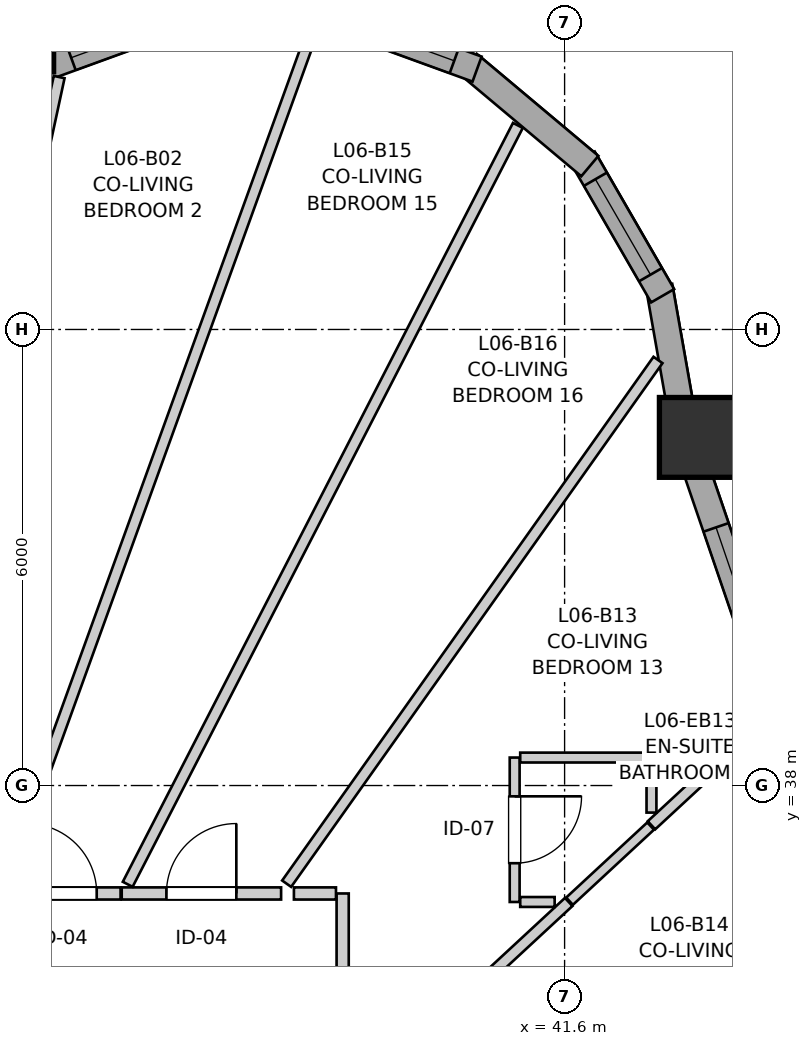
"""IFC4 building model, lengths in metres.
Left out: names, types, materials, properties, quantities, classifications, styles, units other than length and angle.
Written with IfcOpenShell. Run it as: python <this file> out.ifc"""

import sys

from ifc_helpers import new_model, si_unit, direction, frame, frame_2d, origin, origin_2d, place, context, subcontext, project, spatial, rectangle, i_section, extrude, source, transform, mapped, element, fill, save


model = new_model("IFC4")
c1 = context("Model", 3, precision=1e-05, world=origin(), true_north=direction((0.0, 1.0)))
c2 = subcontext(c1, "Body", "Model", "MODEL_VIEW")
j1 = project(units=[si_unit("LENGTHUNIT", "METRE"), si_unit("PLANEANGLEUNIT", "RADIAN")], contexts=[c1])
p1 = place(None, origin())
s1 = spatial("IfcSite", under=j1, at=p1, CompositionType="ELEMENT")
p2 = place(p1, origin())
s2 = spatial("IfcBuilding", under=s1, at=p2, CompositionType="ELEMENT")
p3 = place(p2, frame((0.0, 0.0, 23.8)))
s3 = spatial("IfcBuildingStorey", under=s2, at=p3, CompositionType="ELEMENT", Elevation=23.8)
m1 = source(origin(), c2, "Body", "SweptSolid", [
    extrude(rectangle(XDim=1.05, YDim=1.05, at=origin_2d()), origin(), (0.0, 0.0, 1.0), 2.935),
])
p4 = place(p3, frame((43.373, 42.58, 0.0), z_axis=(0.0, 0.0, 1.0), x_axis=(1.0, 0.0, 0.0)))
e1 = element("IfcColumn", 1, at=p4, inside=s3, PredefinedType="COLUMN", context=c2, shape_type="MappedRepresentation", body=[
    mapped(m1, transform((0.0, 0.0, 0.0), x_axis=(1.0, 0.0, 0.0), y_axis=(0.0, 1.0, 0.0), z_axis=(0.0, 0.0, 1.0), scale=1.0)),
])
m2 = source(origin(), c2, "Body", "SweptSolid", [
    extrude(i_section(OverallWidth=0.409, OverallDepth=0.425, WebThickness=0.03, FlangeThickness=0.048, FilletRadius=0.015, at=origin_2d()), origin(), (0.0, 0.0, 1.0), 2.935),
])
p5 = place(p3, frame((34.673, 47.603, 0.0), z_axis=(0.0, 0.0, 1.0), x_axis=(1.0, 0.0, 0.0)))
e2 = element("IfcColumn", 2, at=p5, inside=s3, PredefinedType="PILASTER", context=c2, shape_type="MappedRepresentation", body=[
    mapped(m2, transform((0.0, 0.0, 0.0), x_axis=(1.0, 0.0, 0.0), y_axis=(0.0, 1.0, 0.0), z_axis=(0.0, 0.0, 1.0), scale=1.0)),
])
p6 = place(p3, frame((44.353, 39.171, 0.0), z_axis=(0.0, 0.0, 1.0), x_axis=(-0.323604310653, 0.946192501623, 0.0)))
e3 = element("IfcWall", 3, at=p6, inside=s3, PredefinedType="SOLIDWALL", context=c2, shape_type="SweptSolid", body=[
    extrude(rectangle(XDim=3.243, YDim=0.35, at=frame_2d((1.621, 0.0))), origin(), (0.0, 0.0, 1.0), 2.415),
])
p7 = place(p6, frame((0.901, 0.0, 0.82)))
e4 = element("IfcOpeningElement", 4, at=p7, cuts=e3, PredefinedType="OPENING", context=c2, shape_type="SweptSolid", body=[
    extrude(rectangle(XDim=1.45, YDim=1.25, at=frame_2d((0.725, 0.625))), frame((0.0, 0.185, 0.0), z_axis=(0.0, -1.0, 0.0), x_axis=(1.0, 0.0, 0.0)), (0.0, 0.0, 1.0), 0.37),
])
p8 = place(p3, frame((43.148, 42.845, 0.0), z_axis=(0.0, 0.0, 1.0), x_axis=(-0.173745591742, 0.984790571315, 0.0)))
e5 = element("IfcWall", 5, at=p8, inside=s3, PredefinedType="SOLIDWALL", context=c2, shape_type="SweptSolid", body=[
    extrude(rectangle(XDim=1.752, YDim=0.35, at=frame_2d((0.876, 0.0))), origin(), (0.0, 0.0, 1.0), 2.415),
])
p9 = place(p3, frame((42.89, 44.443, 0.0), z_axis=(0.0, 0.0, 1.0), x_axis=(-0.499995423472, 0.866028046028, 0.0)))
e6 = element("IfcWall", 6, at=p9, inside=s3, PredefinedType="SOLIDWALL", context=c2, shape_type="SweptSolid", body=[
    extrude(rectangle(XDim=2.09, YDim=0.35, at=frame_2d((1.045, 0.0))), origin(), (0.0, 0.0, 1.0), 2.415),
])
p10 = place(p9, frame((0.32, 0.0, 0.82)))
e7 = element("IfcOpeningElement", 7, at=p10, cuts=e6, PredefinedType="OPENING", context=c2, shape_type="SweptSolid", body=[
    extrude(rectangle(XDim=1.45, YDim=1.25, at=frame_2d((0.725, 0.625))), frame((0.0, 0.185, 0.0), z_axis=(0.0, -1.0, 0.0), x_axis=(1.0, 0.0, 0.0)), (0.0, 0.0, 1.0), 0.37),
])
p11 = place(p3, frame((41.932, 46.15, 0.0), z_axis=(0.0, 0.0, 1.0), x_axis=(-0.766024572719, 0.642811289563, 0.0)))
e8 = element("IfcWall", 8, at=p11, inside=s3, PredefinedType="SOLIDWALL", context=c2, shape_type="SweptSolid", body=[
    extrude(rectangle(XDim=2.09, YDim=0.35, at=frame_2d((1.045, 0.0))), origin(), (0.0, 0.0, 1.0), 2.415),
])
p12 = place(p3, frame((40.448, 47.426, 0.0), z_axis=(0.0, 0.0, 1.0), x_axis=(-0.939711556618, 0.341968113072, 0.0)))
e9 = element("IfcWall", 9, at=p12, inside=s3, PredefinedType="SOLIDWALL", context=c2, shape_type="SweptSolid", body=[
    extrude(rectangle(XDim=2.09, YDim=0.35, at=frame_2d((1.045, 0.0))), origin(), (0.0, 0.0, 1.0), 2.415),
])
p13 = place(p12, frame((0.32, 0.0, 0.82)))
e10 = element("IfcOpeningElement", 10, at=p13, cuts=e9, PredefinedType="OPENING", context=c2, shape_type="SweptSolid", body=[
    extrude(rectangle(XDim=1.45, YDim=1.25, at=frame_2d((0.725, 0.625))), frame((0.0, 0.185, 0.0), z_axis=(0.0, -1.0, 0.0), x_axis=(1.0, 0.0, 0.0)), (0.0, 0.0, 1.0), 0.37),
])
p14 = place(p3, frame((36.661, 48.14, 0.0), z_axis=(0.0, 0.0, 1.0), x_axis=(-0.939691662178, -0.342022777067, 0.0)))
e11 = element("IfcWall", 11, at=p14, inside=s3, PredefinedType="SOLIDWALL", context=c2, shape_type="SweptSolid", body=[
    extrude(rectangle(XDim=2.032, YDim=0.35, at=frame_2d((1.016, 0.0))), origin(), (0.0, 0.0, 1.0), 2.415),
])
p15 = place(p14, frame((0.302, 0.0, 0.82)))
e12 = element("IfcOpeningElement", 12, at=p15, cuts=e11, PredefinedType="OPENING", context=c2, shape_type="SweptSolid", body=[
    extrude(rectangle(XDim=1.35, YDim=1.45, at=frame_2d((0.675, 0.725))), frame((0.0, 0.185, 0.0), z_axis=(0.0, -1.0, 0.0), x_axis=(1.0, 0.0, 0.0)), (0.0, 0.0, 1.0), 0.37),
])
p16 = place(p3, frame((38.68, 36.58, 0.0), z_axis=(0.0, 0.0, 1.0), x_axis=(0.0, -1.0, 0.0)))
e13 = element("IfcWall", 13, at=p16, inside=s3, PredefinedType="PARTITIONING", context=c2, shape_type="SweptSolid", body=[
    extrude(rectangle(XDim=2.83, YDim=0.16, at=frame_2d((1.415, 0.0))), origin(), (0.0, 0.0, 1.0), 2.935),
])
p17 = place(p16, frame((0.973, 0.0, 0.0)))
e14 = element("IfcOpeningElement", 14, at=p17, cuts=e13, PredefinedType="OPENING", context=c2, shape_type="SweptSolid", body=[
    extrude(rectangle(XDim=0.92, YDim=2.1, at=frame_2d((0.46, 1.05))), frame((0.0, 0.09, 0.0), z_axis=(0.0, -1.0, 0.0), x_axis=(1.0, 0.0, 0.0)), (0.0, 0.0, 1.0), 0.18),
])
p18 = place(p3, frame((35.773, 36.58, 0.0), z_axis=(0.0, 0.0, 1.0), x_axis=(1.0, 0.0, 0.0)))
e15 = element("IfcWall", 15, at=p18, inside=s3, PredefinedType="PARTITIONING", context=c2, shape_type="SweptSolid", body=[
    extrude(rectangle(XDim=2.097, YDim=0.16, at=frame_2d((1.049, 0.0))), origin(), (0.0, 0.0, 1.0), 2.935),
])
p19 = place(p18, frame((0.588, 0.0, 0.0)))
e16 = element("IfcOpeningElement", 16, at=p19, cuts=e15, PredefinedType="OPENING", context=c2, shape_type="SweptSolid", body=[
    extrude(rectangle(XDim=0.92, YDim=2.1, at=frame_2d((0.46, 1.05))), frame((0.0, 0.09, 0.0), z_axis=(0.0, -1.0, 0.0), x_axis=(1.0, 0.0, 0.0)), (0.0, 0.0, 1.0), 0.18),
])
p20 = place(p3, frame((40.943, 38.368, 0.0), z_axis=(0.0, 0.0, 1.0), x_axis=(0.0, -1.0, 0.0)))
e17 = element("IfcWall", 17, at=p20, inside=s3, PredefinedType="PARTITIONING", context=c2, shape_type="SweptSolid", body=[
    extrude(rectangle(XDim=1.9, YDim=0.13, at=frame_2d((0.95, 0.0))), origin(), (0.0, 0.0, 1.0), 2.935),
])
p21 = place(p20, frame((0.51, 0.0, 0.0)))
e18 = element("IfcOpeningElement", 18, at=p21, cuts=e17, PredefinedType="OPENING", context=c2, shape_type="SweptSolid", body=[
    extrude(rectangle(XDim=0.88, YDim=2.05, at=frame_2d((0.44, 1.025))), frame((0.0, 0.075, 0.0), z_axis=(0.0, -1.0, 0.0), x_axis=(1.0, 0.0, 0.0)), (0.0, 0.0, 1.0), 0.15),
])
p22 = place(p3, frame((34.162, 36.58, 0.0), z_axis=(0.0, 0.0, 1.0), x_axis=(1.0, 0.0, 0.0)))
e19 = element("IfcWall", 19, at=p22, inside=s3, PredefinedType="PARTITIONING", context=c2, shape_type="SweptSolid", body=[
    extrude(rectangle(XDim=1.596, YDim=0.16, at=frame_2d((0.798, 0.0))), origin(), (0.0, 0.0, 1.0), 2.935),
])
p23 = place(p22, frame((0.362, 0.0, 0.0)))
e20 = element("IfcOpeningElement", 20, at=p23, cuts=e19, PredefinedType="OPENING", context=c2, shape_type="SweptSolid", body=[
    extrude(rectangle(XDim=0.92, YDim=2.1, at=frame_2d((0.46, 1.05))), frame((0.0, 0.09, 0.0), z_axis=(0.0, -1.0, 0.0), x_axis=(1.0, 0.0, 0.0)), (0.0, 0.0, 1.0), 0.18),
])
p24 = place(p3, frame((34.219, 36.692, 0.0), z_axis=(0.0, 0.0, 1.0), x_axis=(0.340186046968, 0.940358151689, 0.0)))
e21 = element("IfcWall", 21, at=p24, inside=s3, PredefinedType="PARTITIONING", context=c2, shape_type="SweptSolid", body=[
    extrude(rectangle(XDim=11.951, YDim=0.145, at=frame_2d((5.976, 0.0))), origin(), (0.0, 0.0, 1.0), 2.935),
])
p25 = place(p3, frame((35.852, 36.7, 0.0), z_axis=(0.0, 0.0, 1.0), x_axis=(0.457258091214, 0.889334041865, 0.0)))
e22 = element("IfcWall", 22, at=p25, inside=s3, PredefinedType="PARTITIONING", context=c2, shape_type="SweptSolid", body=[
    extrude(rectangle(XDim=11.227, YDim=0.145, at=frame_2d((5.613, 0.0))), origin(), (0.0, 0.0, 1.0), 2.935),
])
p26 = place(p3, frame((32.655, 36.683, 0.0), z_axis=(0.0, 0.0, 1.0), x_axis=(0.210861831441, 0.977515876107, 0.0)))
e23 = element("IfcWall", 23, at=p26, inside=s3, PredefinedType="PARTITIONING", context=c2, shape_type="SweptSolid", body=[
    extrude(rectangle(XDim=10.882, YDim=0.145, at=frame_2d((5.441, 0.0))), origin(), (0.0, 0.0, 1.0), 2.935),
])
p27 = place(p3, frame((37.943, 36.708, 0.0), z_axis=(0.0, 0.0, 1.0), x_axis=(0.578429476704, 0.81573239514, 0.0)))
e24 = element("IfcWall", 24, at=p27, inside=s3, PredefinedType="PARTITIONING", context=c2, shape_type="SweptSolid", body=[
    extrude(rectangle(XDim=8.447, YDim=0.145, at=frame_2d((4.223, 0.0))), origin(), (0.0, 0.0, 1.0), 2.935),
])
p28 = place(p3, frame((38.815, 33.839, 0.0), z_axis=(0.0, 0.0, 1.0), x_axis=(0.733718730688, 0.67945332749, 0.0)))
e25 = element("IfcWall", 25, at=p28, inside=s3, PredefinedType="PARTITIONING", context=c2, shape_type="SweptSolid", body=[
    extrude(rectangle(XDim=3.869, YDim=0.145, at=frame_2d((1.935, 0.0))), origin(), (0.0, 0.0, 1.0), 2.935),
])
p29 = place(p3, frame((42.743, 37.477, 0.0), z_axis=(0.0, 0.0, 1.0), x_axis=(0.73374741774, 0.679422347999, 0.0)))
e26 = element("IfcWall", 26, at=p29, inside=s3, PredefinedType="PARTITIONING", context=c2, shape_type="SweptSolid", body=[
    extrude(rectangle(XDim=2.04, YDim=0.145, at=frame_2d((1.02, 0.0))), origin(), (0.0, 0.0, 1.0), 2.935),
])
p30 = place(p3, frame((41.016, 38.368, 0.0), z_axis=(0.0, 0.0, 1.0), x_axis=(1.0, 0.0, 0.0)))
e27 = element("IfcWall", 27, at=p30, inside=s3, PredefinedType="PARTITIONING", context=c2, shape_type="SweptSolid", body=[
    extrude(rectangle(XDim=1.727, YDim=0.13, at=frame_2d((0.863, 0.0))), origin(), (0.0, 0.0, 1.0), 2.935),
])
p31 = place(p3, frame((41.665, 36.478, 0.0), z_axis=(0.0, 0.0, 1.0), x_axis=(0.733534386117, 0.679652340821, 0.0)))
e28 = element("IfcWall", 28, at=p31, inside=s3, PredefinedType="PARTITIONING", context=c2, shape_type="SweptSolid", body=[
    extrude(rectangle(XDim=1.454, YDim=0.13, at=frame_2d((0.727, 0.0))), origin(), (0.0, 0.0, 1.0), 2.935),
])
p32 = place(p3, frame((42.743, 37.644, 0.0), z_axis=(0.0, 0.0, 1.0), x_axis=(0.0, 1.0, 0.0)))
e29 = element("IfcWall", 29, at=p32, inside=s3, PredefinedType="PARTITIONING", context=c2, shape_type="SweptSolid", body=[
    extrude(rectangle(XDim=0.651, YDim=0.13, at=frame_2d((0.325, 0.0))), origin(), (0.0, 0.0, 1.0), 2.935),
])
p33 = place(p3, frame((38.039, 36.58, 0.0), z_axis=(0.0, 0.0, 1.0), x_axis=(1.0, 0.0, 0.0)))
e30 = element("IfcWall", 30, at=p33, inside=s3, PredefinedType="PARTITIONING", context=c2, shape_type="SweptSolid", body=[
    extrude(rectangle(XDim=0.553, YDim=0.16, at=frame_2d((0.277, 0.0))), origin(), (0.0, 0.0, 1.0), 2.935),
])
p34 = place(p3, frame((41.016, 36.468, 0.0), z_axis=(0.0, 0.0, 1.0), x_axis=(1.0, 0.0, 0.0)))
e31 = element("IfcWall", 31, at=p34, inside=s3, PredefinedType="PARTITIONING", context=c2, shape_type="SweptSolid", body=[
    extrude(rectangle(XDim=0.453, YDim=0.13, at=frame_2d((0.227, 0.0))), origin(), (0.0, 0.0, 1.0), 2.935),
])
m3 = source(origin(), c2, "Body", "SweptSolid", [
    extrude(rectangle(XDim=1.45, YDim=1.25, at=frame_2d((0.725, 0.625))), frame((0.0, 0.03, 0.0), z_axis=(0.0, -1.0, 0.0), x_axis=(1.0, 0.0, 0.0)), (0.0, 0.0, 1.0), 0.06),
])
p35 = place(p7, origin())
e32 = element("IfcWindow", 32, at=p35, inside=s3, PartitioningType="SINGLE_PANEL", PredefinedType="WINDOW", context=c2, shape_type="MappedRepresentation", body=[
    mapped(m3, transform((0.0, 0.0, 0.0), x_axis=(1.0, 0.0, 0.0), y_axis=(0.0, 1.0, 0.0), z_axis=(0.0, 0.0, 1.0), scale=1.0)),
])
fill(e4, e32)
p36 = place(p10, origin())
e33 = element("IfcWindow", 33, at=p36, inside=s3, PartitioningType="SINGLE_PANEL", PredefinedType="WINDOW", context=c2, shape_type="MappedRepresentation", body=[
    mapped(m3, transform((0.0, 0.0, 0.0), x_axis=(1.0, 0.0, 0.0), y_axis=(0.0, 1.0, 0.0), z_axis=(0.0, 0.0, 1.0), scale=1.0)),
])
fill(e7, e33)
p37 = place(p13, origin())
e34 = element("IfcWindow", 34, at=p37, inside=s3, PartitioningType="SINGLE_PANEL", PredefinedType="WINDOW", context=c2, shape_type="MappedRepresentation", body=[
    mapped(m3, transform((0.0, 0.0, 0.0), x_axis=(1.0, 0.0, 0.0), y_axis=(0.0, 1.0, 0.0), z_axis=(0.0, 0.0, 1.0), scale=1.0)),
])
fill(e10, e34)
m4 = source(origin(), c2, "Body", "SweptSolid", [
    extrude(rectangle(XDim=1.35, YDim=1.45, at=frame_2d((0.675, 0.725))), frame((0.0, 0.03, 0.0), z_axis=(0.0, -1.0, 0.0), x_axis=(1.0, 0.0, 0.0)), (0.0, 0.0, 1.0), 0.06),
])
p38 = place(p15, origin())
e35 = element("IfcWindow", 35, at=p38, inside=s3, PartitioningType="SINGLE_PANEL", PredefinedType="WINDOW", context=c2, shape_type="MappedRepresentation", body=[
    mapped(m4, transform((0.0, 0.0, 0.0), x_axis=(1.0, 0.0, 0.0), y_axis=(0.0, 1.0, 0.0), z_axis=(0.0, 0.0, 1.0), scale=1.0)),
])
fill(e12, e35)
m5 = source(origin(), c2, "Body", "SweptSolid", [
    extrude(rectangle(XDim=0.92, YDim=2.1, at=frame_2d((0.46, 1.05))), frame((0.0, 0.025, 0.0), z_axis=(0.0, -1.0, 0.0), x_axis=(1.0, 0.0, 0.0)), (0.0, 0.0, 1.0), 0.05),
])
p39 = place(p19, origin())
e36 = element("IfcDoor", 36, at=p39, inside=s3, OperationType="SINGLE_SWING_RIGHT", PredefinedType="DOOR", context=c2, shape_type="MappedRepresentation", body=[
    mapped(m5, transform((0.0, 0.0, 0.0), x_axis=(1.0, 0.0, 0.0), y_axis=(0.0, 1.0, 0.0), z_axis=(0.0, 0.0, 1.0), scale=1.0)),
])
fill(e16, e36)
m6 = source(origin(), c2, "Body", "SweptSolid", [
    extrude(rectangle(XDim=0.88, YDim=2.05, at=frame_2d((0.44, 1.025))), frame((0.0, 0.025, 0.0), z_axis=(0.0, -1.0, 0.0), x_axis=(1.0, 0.0, 0.0)), (0.0, 0.0, 1.0), 0.05),
])
p40 = place(p21, origin())
e37 = element("IfcDoor", 37, at=p40, inside=s3, OperationType="SINGLE_SWING_LEFT", PredefinedType="DOOR", context=c2, shape_type="MappedRepresentation", body=[
    mapped(m6, transform((0.0, 0.0, 0.0), x_axis=(1.0, 0.0, 0.0), y_axis=(0.0, 1.0, 0.0), z_axis=(0.0, 0.0, 1.0), scale=1.0)),
])
fill(e18, e37)
p41 = place(p23, origin())
e38 = element("IfcDoor", 38, at=p41, inside=s3, OperationType="SINGLE_SWING_LEFT", PredefinedType="DOOR", context=c2, shape_type="MappedRepresentation", body=[
    mapped(m5, transform((0.0, 0.0, 0.0), x_axis=(1.0, 0.0, 0.0), y_axis=(0.0, 1.0, 0.0), z_axis=(0.0, 0.0, 1.0), scale=1.0)),
])
fill(e20, e38)
save(model, sys.argv[1])
